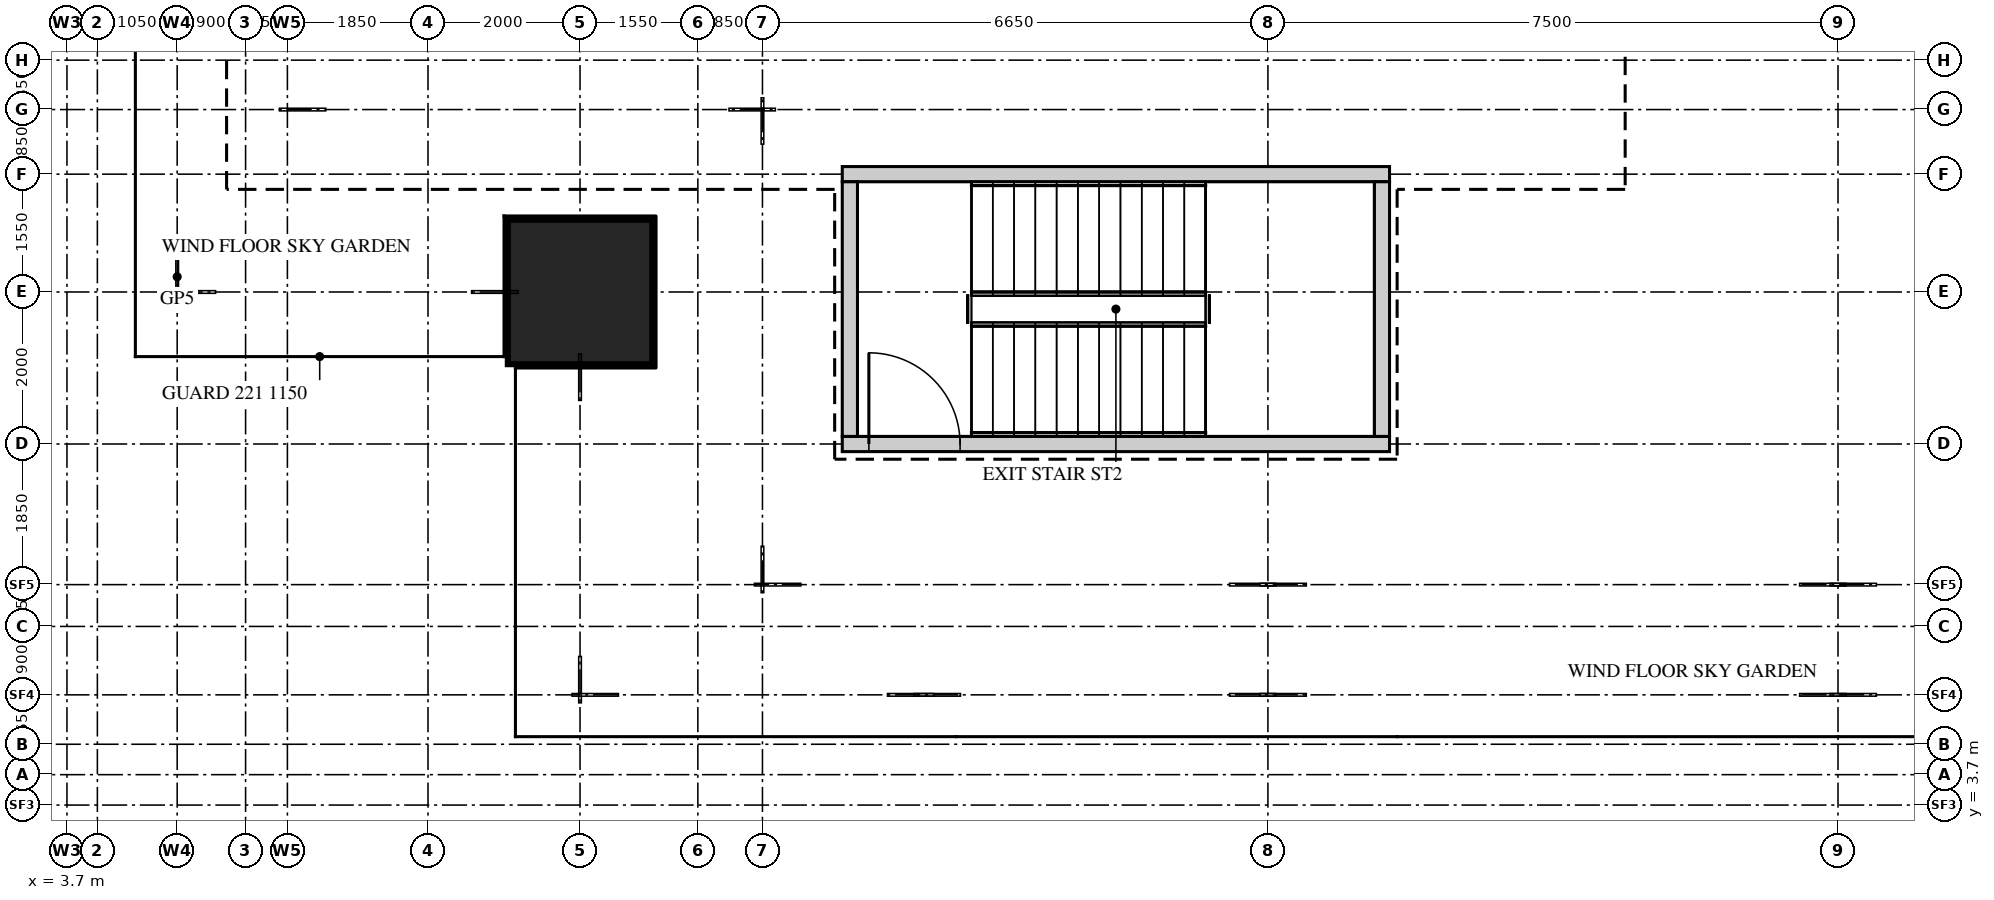
"""IFC4 building model, lengths in metres.
Left out: names, types, materials, properties, quantities, classifications, styles, units other than length and angle.
Written with IfcOpenShell. Run it as: python <this file> out.ifc"""

import sys

from ifc_helpers import new_model, si_unit, direction, frame, frame_2d, origin, origin_2d, place, context, subcontext, project, spatial, rectangle, extrude, source, transform, mapped, element, fill, save


model = new_model("IFC4")
c1 = context("Model", 3, precision=1e-05, world=origin(), true_north=direction((0.0, 1.0)))
c2 = subcontext(c1, "Body", "Model", "MODEL_VIEW")
j1 = project(units=[si_unit("LENGTHUNIT", "METRE"), si_unit("PLANEANGLEUNIT", "RADIAN")], contexts=[c1])
p1 = place(None, origin())
s1 = spatial("IfcSite", under=j1, at=p1, CompositionType="ELEMENT")
p2 = place(p1, origin())
s2 = spatial("IfcBuilding", under=s1, at=p2, CompositionType="ELEMENT")
p3 = place(p2, frame((0.0, 0.0, 274.2)))
s3 = spatial("IfcBuildingStorey", under=s2, at=p3, CompositionType="ELEMENT", Elevation=274.2)
m1 = source(origin(), c2, "Body", "SweptSolid", [
    extrude(rectangle(XDim=7.2, YDim=0.2, at=frame_2d((3.6, 0.0))), origin(), (0.0, 0.0, 1.0), 7.75),
])
p4 = place(p3, frame((13.9, 12.0, 0.0), z_axis=(0.0, 0.0, 1.0), x_axis=(1.0, 0.0, 0.0)))
e1 = element("IfcWall", 1, at=p4, inside=s3, PredefinedType="SHEAR", context=c2, shape_type="MappedRepresentation", body=[
    mapped(m1, transform((0.0, 0.0, 0.0))),
])
p5 = place(p3, frame((13.9, 8.45, 0.0), z_axis=(0.0, 0.0, 1.0), x_axis=(1.0, 0.0, 0.0)))
e2 = element("IfcWall", 2, at=p5, inside=s3, PredefinedType="SHEAR", context=c2, shape_type="MappedRepresentation", body=[
    mapped(m1, transform((0.0, 0.0, 0.0))),
])
m2 = source(origin(), c2, "Body", "SweptSolid", [
    extrude(rectangle(XDim=1.2, YDim=2.1, at=frame_2d((0.6, 1.05))), frame((0.0, 0.11, 0.0), z_axis=(0.0, -1.0, 0.0), x_axis=(1.0, 0.0, 0.0)), (0.0, 0.0, 1.0), 0.22),
])
p6 = place(p5, frame((0.35, 0.0, 0.0)))
e3 = element("IfcOpeningElement", 3, at=p6, cuts=e2, PredefinedType="OPENING", context=c2, shape_type="MappedRepresentation", body=[
    mapped(m2, transform((0.0, 0.0, 0.0))),
])
m3 = source(origin(), c2, "Body", "SweptSolid", [
    extrude(rectangle(XDim=3.35, YDim=0.2, at=frame_2d((1.675, 0.0))), origin(), (0.0, 0.0, 1.0), 7.75),
])
for number, where, z_axis, x_axis in (
    (4, (21.0, 8.55, 0.0), (0.0, 0.0, 1.0), (0.0, 1.0, 0.0)),
    (5, (14.0, 8.55, 0.0), (0.0, 0.0, 1.0), (0.0, 1.0, 0.0)),
):
    element("IfcWall", number, at=place(p3, frame(where, z_axis=z_axis, x_axis=x_axis)), inside=s3, PredefinedType="SHEAR", context=c2, shape_type="MappedRepresentation", body=[
        mapped(m3, transform((0.0, 0.0, 0.0))),
    ])
m4 = source(origin(), c2, "Body", "SweptSolid", [
    extrude(rectangle(XDim=1.9, YDim=1.9, at=origin_2d()), origin(), (0.0, 0.0, 1.0), 8.0),
])
p7 = place(p3, frame((10.45, 10.45, 0.0), z_axis=(0.0, 0.0, 1.0), x_axis=(1.0, 0.0, 0.0)))
e6 = element("IfcColumn", 6, at=p7, inside=s3, PredefinedType="COLUMN", context=c2, shape_type="MappedRepresentation", body=[
    mapped(m4, transform((0.0, 0.0, 0.0))),
])
m5 = source(origin(), c2, "Body", "SweptSolid", [
    extrude(rectangle(XDim=1.2, YDim=2.1, at=frame_2d((0.6, 1.05))), frame((0.0, 0.025, 0.0), z_axis=(0.0, -1.0, 0.0), x_axis=(1.0, 0.0, 0.0)), (0.0, 0.0, 1.0), 0.05),
])
p8 = place(p6, origin())
e7 = element("IfcDoor", 7, at=p8, inside=s3, OperationType="SINGLE_SWING_RIGHT", PredefinedType="DOOR", context=c2, shape_type="MappedRepresentation", body=[
    mapped(m5, transform((0.0, 0.0, 0.0))),
])
fill(e3, e7)
save(model, sys.argv[1])
